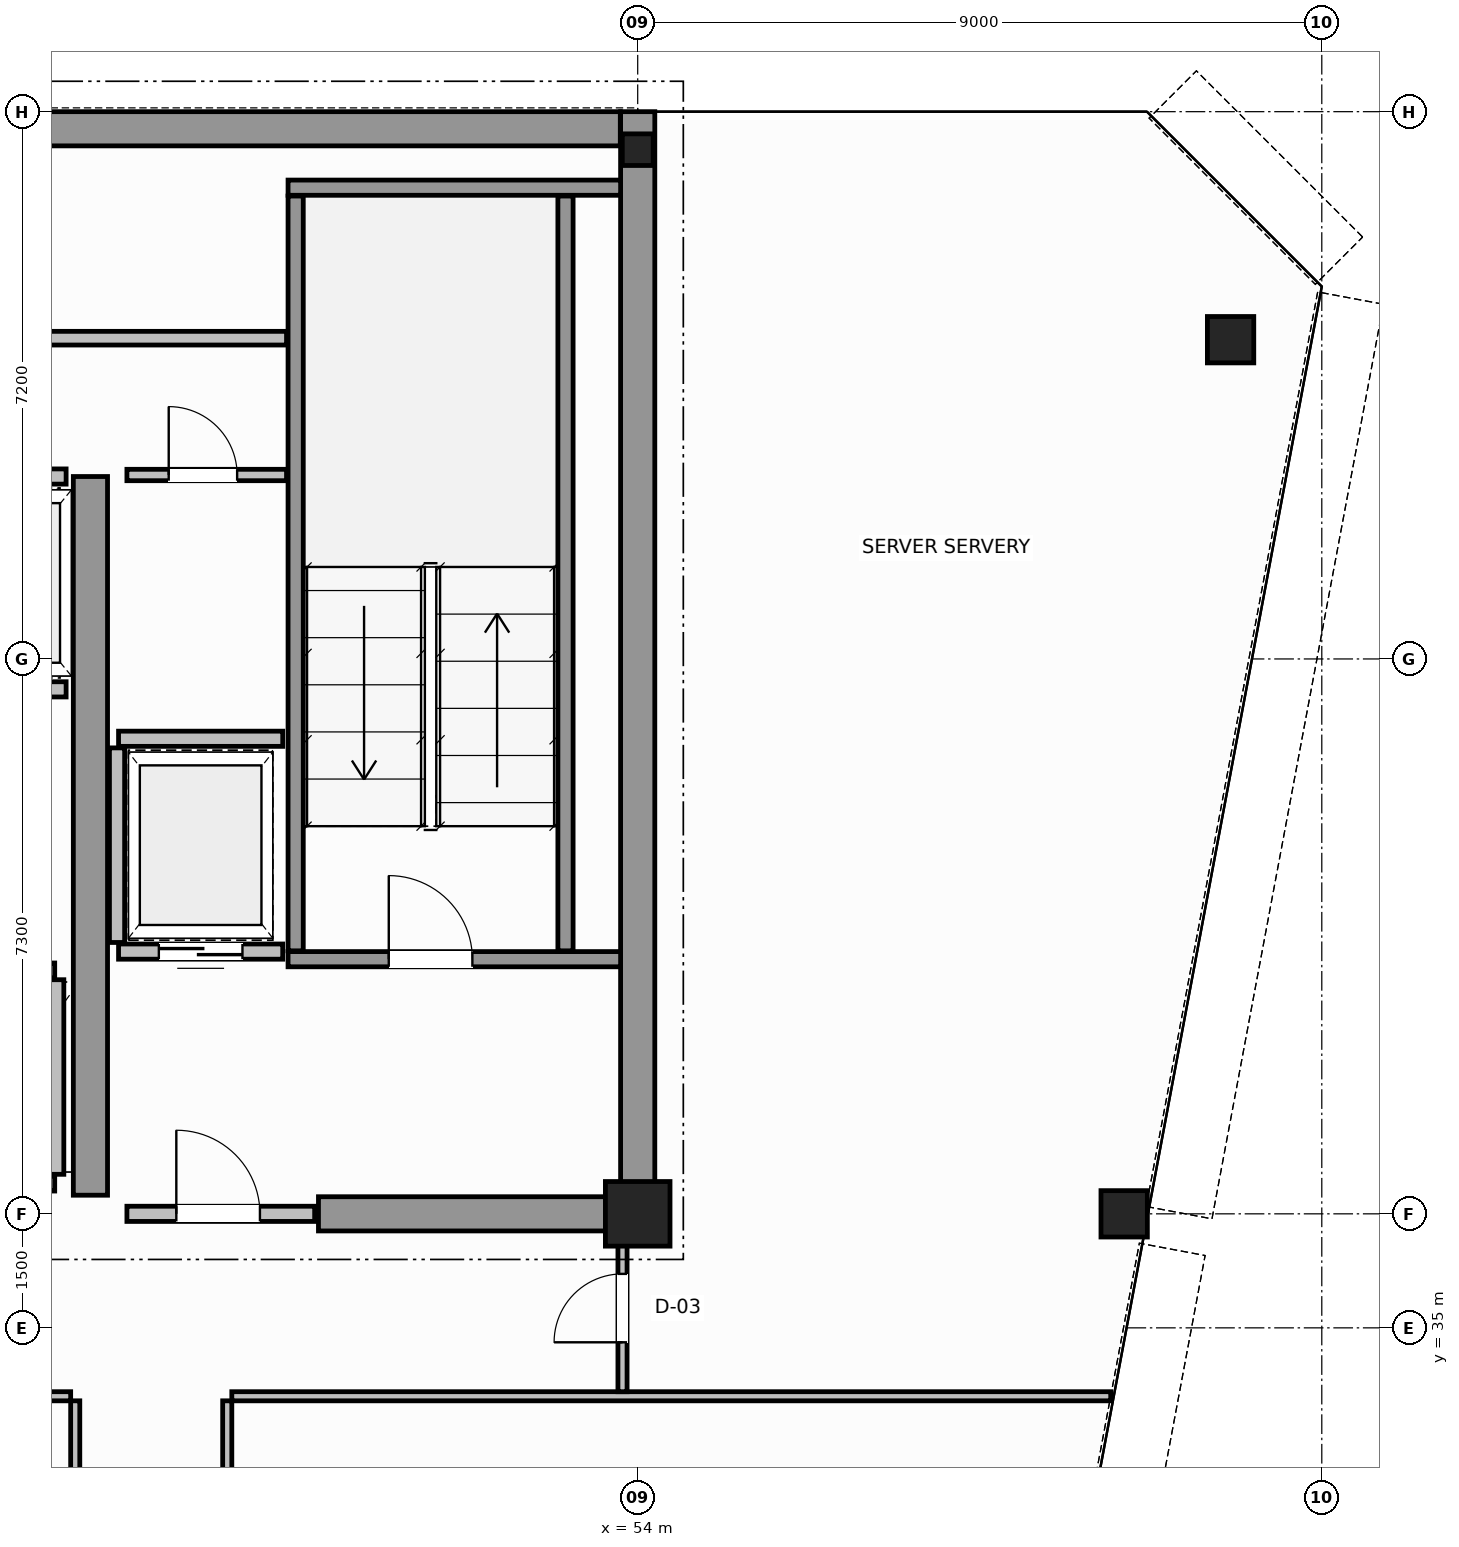
"""IFC4 building model, lengths in metres.
Left out: names, types, materials, properties, quantities, classifications, styles, units other than length and angle.
Written with IfcOpenShell. Run it as: python <this file> out.ifc"""

import sys

from ifc_helpers import new_model, si_unit, direction, frame, frame_2d, origin, origin_2d, place, context, subcontext, project, spatial, rectangle, hollow_circle, i_section, extrude, source, transform, mapped, element, fill, save


model = new_model("IFC4")
c1 = context("Model", 3, precision=1e-05, world=origin(), true_north=direction((0.0, 1.0)))
c2 = subcontext(c1, "Body", "Model", "MODEL_VIEW")
j1 = project(units=[si_unit("LENGTHUNIT", "METRE"), si_unit("PLANEANGLEUNIT", "RADIAN")], contexts=[c1])
p1 = place(None, origin())
s1 = spatial("IfcSite", under=j1, at=p1, CompositionType="ELEMENT")
p2 = place(p1, origin())
s2 = spatial("IfcBuilding", under=s1, at=p2, CompositionType="ELEMENT")
p3 = place(p2, frame((0.0, 0.0, 284.0)))
s3 = spatial("IfcBuildingStorey", under=s2, at=p3, CompositionType="ELEMENT", Elevation=284.0)
m1 = source(origin(), c2, "Body", "SweptSolid", [
    extrude(rectangle(XDim=0.85, YDim=0.85, at=origin_2d()), origin(), (0.0, 0.0, 1.0), 3.8),
])
p4 = place(p3, frame((54.0, 36.5, 0.0), z_axis=(0.0, 0.0, 1.0), x_axis=(1.0, 0.0, 0.0)))
e1 = element("IfcColumn", 1, at=p4, inside=s3, PredefinedType="COLUMN", context=c2, shape_type="MappedRepresentation", body=[
    mapped(m1, transform((0.0, 0.0, 0.0), scale=1.0)),
])
m2 = source(origin(), c2, "Body", "SweptSolid", [
    extrude(i_section(OverallWidth=0.406, OverallDepth=0.416, WebThickness=0.03, FlangeThickness=0.042, FilletRadius=0.015, at=origin_2d()), origin(), (0.0, 0.0, 1.0), 3.8),
])
p5 = place(p3, frame((54.0, 50.5, 0.0), z_axis=(0.0, 0.0, 1.0), x_axis=(1.0, 0.0, 0.0)))
e2 = element("IfcColumn", 2, at=p5, inside=s3, PredefinedType="COLUMN", context=c2, shape_type="MappedRepresentation", body=[
    mapped(m2, transform((0.0, 0.0, 0.0), scale=1.0)),
])
m3 = source(origin(), c2, "Body", "SweptSolid", [
    extrude(hollow_circle(Radius=0.305, WallThickness=0.03, at=origin_2d()), origin(), (0.0, 0.0, 1.0), 3.8),
])
for number, where, z_axis, x_axis in (
    (3, (61.8, 48.0, 0.0), (0.0, 0.0, 1.0), (1.0, 0.0, 0.0)),
    (4, (60.4, 36.5, 0.0), (0.0, 0.0, 1.0), (1.0, 0.0, 0.0)),
):
    element("IfcColumn", number, at=place(p3, frame(where, z_axis=z_axis, x_axis=x_axis)), inside=s3, PredefinedType="COLUMN", context=c2, shape_type="MappedRepresentation", body=[
        mapped(m3, transform((0.0, 0.0, 0.0), scale=1.0)),
    ])
p6 = place(p3, frame((34.002, 50.775, 0.0), z_axis=(0.0, 0.0, 1.0), x_axis=(1.0, 0.0, 0.0)))
e5 = element("IfcWall", 5, at=p6, inside=s3, PredefinedType="SHEAR", context=c2, shape_type="SweptSolid", body=[
    extrude(rectangle(XDim=19.769, YDim=0.45, at=frame_2d((9.885, 0.0))), origin(), (0.0, 0.0, 1.0), 3.8),
])
p7 = place(p3, frame((54.0, 36.5, 0.0), z_axis=(0.0, 0.0, 1.0), x_axis=(0.0, 1.0, 0.0)))
e6 = element("IfcWall", 6, at=p7, inside=s3, PredefinedType="SHEAR", context=c2, shape_type="SweptSolid", body=[
    extrude(rectangle(XDim=14.5, YDim=0.45, at=frame_2d((7.25, 0.0))), origin(), (0.0, 0.0, 1.0), 3.8),
])
p8 = place(p3, frame((49.8, 36.5, 0.0), z_axis=(0.0, 0.0, 1.0), x_axis=(1.0, 0.0, 0.0)))
e7 = element("IfcWall", 7, at=p8, inside=s3, PredefinedType="SHEAR", context=c2, shape_type="SweptSolid", body=[
    extrude(rectangle(XDim=3.955, YDim=0.45, at=frame_2d((1.978, 0.0))), origin(), (0.0, 0.0, 1.0), 2.58),
])
p9 = place(p3, frame((46.8, 36.745, 0.0), z_axis=(0.0, 0.0, 1.0), x_axis=(0.0, 1.0, 0.0)))
e8 = element("IfcWall", 8, at=p9, inside=s3, PredefinedType="SHEAR", context=c2, shape_type="SweptSolid", body=[
    extrude(rectangle(XDim=9.455, YDim=0.45, at=frame_2d((4.728, 0.0))), origin(), (0.0, 0.0, 1.0), 3.8),
])
p10 = place(p3, frame((49.4, 39.85, 0.0), z_axis=(0.0, 0.0, 1.0), x_axis=(1.0, 0.0, 0.0)))
e9 = element("IfcWall", 9, at=p10, inside=s3, PredefinedType="SOLIDWALL", context=c2, shape_type="SweptSolid", body=[
    extrude(rectangle(XDim=4.375, YDim=0.2, at=frame_2d((2.188, 0.0))), origin(), (0.0, 0.0, 1.0), 3.8),
])
p11 = place(p10, frame((1.325, 0.0, 0.0)))
e10 = element("IfcOpeningElement", 10, at=p11, cuts=e9, PredefinedType="OPENING", context=c2, shape_type="SweptSolid", body=[
    extrude(rectangle(XDim=1.1, YDim=2.15, at=frame_2d((0.55, 1.075))), frame((0.0, 0.11, 0.0), z_axis=(0.0, -1.0, 0.0), x_axis=(1.0, 0.0, 0.0)), (0.0, 0.0, 1.0), 0.22),
])
p12 = place(p3, frame((49.4, 50.0, 0.0), z_axis=(0.0, 0.0, 1.0), x_axis=(1.0, 0.0, 0.0)))
e11 = element("IfcWall", 11, at=p12, inside=s3, PredefinedType="SOLIDWALL", context=c2, shape_type="SweptSolid", body=[
    extrude(rectangle(XDim=4.375, YDim=0.2, at=frame_2d((2.188, 0.0))), origin(), (0.0, 0.0, 1.0), 3.8),
])
for number, where, z_axis, x_axis in (
    (12, (49.5, 39.96, 0.0), (0.0, 0.0, 1.0), (0.0, 1.0, 0.0)),
    (13, (53.05, 39.96, 0.0), (0.0, 0.0, 1.0), (0.0, 1.0, 0.0)),
):
    element("IfcWall", number, at=place(p3, frame(where, z_axis=z_axis, x_axis=x_axis)), inside=s3, PredefinedType="SOLIDWALL", context=c2, shape_type="SweptSolid", body=[
        extrude(rectangle(XDim=9.93, YDim=0.2, at=frame_2d((4.965, 0.0))), origin(), (0.0, 0.0, 1.0), 3.8),
    ])
p13 = place(p3, frame((47.28, 36.5, 0.0), z_axis=(0.0, 0.0, 1.0), x_axis=(1.0, 0.0, 0.0)))
e14 = element("IfcWall", 14, at=p13, inside=s3, PredefinedType="SOLIDWALL", context=c2, shape_type="SweptSolid", body=[
    extrude(rectangle(XDim=2.47, YDim=0.2, at=frame_2d((1.235, 0.0))), origin(), (0.0, 0.0, 1.0), 2.57),
])
p14 = place(p13, frame((0.65, 0.0, 0.0)))
e15 = element("IfcOpeningElement", 15, at=p14, cuts=e14, PredefinedType="OPENING", context=c2, shape_type="SweptSolid", body=[
    extrude(rectangle(XDim=1.1, YDim=2.15, at=frame_2d((0.55, 1.075))), frame((0.0, 0.11, 0.0), z_axis=(0.0, -1.0, 0.0), x_axis=(1.0, 0.0, 0.0)), (0.0, 0.0, 1.0), 0.22),
])
p15 = place(p3, frame((44.37, 39.7, 0.0), z_axis=(0.0, 0.0, 1.0), x_axis=(1.0, 0.0, 0.0)))
e16 = element("IfcWall", 16, at=p15, inside=s3, PredefinedType="SOLIDWALL", context=c2, shape_type="SweptSolid", body=[
    extrude(rectangle(XDim=1.96, YDim=0.2, at=frame_2d((0.98, 0.0))), origin(), (0.0, 0.0, 1.0), 3.58),
])
p16 = place(p15, frame((0.43, 0.0, 0.0)))
e17 = element("IfcOpeningElement", 17, at=p16, cuts=e16, PredefinedType="OPENING", context=c2, shape_type="SweptSolid", body=[
    extrude(rectangle(XDim=1.1, YDim=2.15, at=frame_2d((0.55, 1.075))), frame((0.0, 0.11, 0.0), z_axis=(0.0, -1.0, 0.0), x_axis=(1.0, 0.0, 0.0)), (0.0, 0.0, 1.0), 0.22),
])
p17 = place(p3, frame((44.37, 36.9, 0.0), z_axis=(0.0, 0.0, 1.0), x_axis=(1.0, 0.0, 0.0)))
e18 = element("IfcWall", 18, at=p17, inside=s3, PredefinedType="SOLIDWALL", context=c2, shape_type="SweptSolid", body=[
    extrude(rectangle(XDim=1.96, YDim=0.2, at=frame_2d((0.98, 0.0))), origin(), (0.0, 0.0, 1.0), 2.57),
])
p18 = place(p3, frame((46.35, 37.02, 0.0), z_axis=(0.0, 0.0, 1.0), x_axis=(0.0, 1.0, 0.0)))
e19 = element("IfcWall", 19, at=p18, inside=s3, PredefinedType="SOLIDWALL", context=c2, shape_type="SweptSolid", body=[
    extrude(rectangle(XDim=2.56, YDim=0.2, at=frame_2d((1.28, 0.0))), origin(), (0.0, 0.0, 1.0), 3.58),
])
p19 = place(p3, frame((44.62, 43.4, 0.0), z_axis=(0.0, 0.0, 1.0), x_axis=(1.0, 0.0, 0.0)))
e20 = element("IfcWall", 20, at=p19, inside=s3, PredefinedType="SOLIDWALL", context=c2, shape_type="SweptSolid", body=[
    extrude(rectangle(XDim=1.86, YDim=0.2, at=frame_2d((0.93, 0.0))), origin(), (0.0, 0.0, 1.0), 3.58),
])
p20 = place(p19, frame((0.38, 0.0, 0.0)))
e21 = element("IfcOpeningElement", 21, at=p20, cuts=e20, PredefinedType="OPENING", context=c2, shape_type="SweptSolid", body=[
    extrude(rectangle(XDim=1.1, YDim=2.15, at=frame_2d((0.55, 1.075))), frame((0.0, 0.11, 0.0), z_axis=(0.0, -1.0, 0.0), x_axis=(1.0, 0.0, 0.0)), (0.0, 0.0, 1.0), 0.22),
])
p21 = place(p3, frame((44.62, 46.2, 0.0), z_axis=(0.0, 0.0, 1.0), x_axis=(1.0, 0.0, 0.0)))
e22 = element("IfcWall", 22, at=p21, inside=s3, PredefinedType="SOLIDWALL", context=c2, shape_type="SweptSolid", body=[
    extrude(rectangle(XDim=1.86, YDim=0.2, at=frame_2d((0.93, 0.0))), origin(), (0.0, 0.0, 1.0), 3.58),
])
p22 = place(p3, frame((47.17, 39.95, 0.0), z_axis=(0.0, 0.0, 1.0), x_axis=(1.0, 0.0, 0.0)))
e23 = element("IfcWall", 23, at=p22, inside=s3, PredefinedType="SOLIDWALL", context=c2, shape_type="SweptSolid", body=[
    extrude(rectangle(XDim=2.16, YDim=0.2, at=frame_2d((1.08, 0.0))), origin(), (0.0, 0.0, 1.0), 3.58),
])
p23 = place(p22, frame((0.53, 0.0, 0.0)))
e24 = element("IfcOpeningElement", 24, at=p23, cuts=e23, PredefinedType="OPENING", context=c2, shape_type="SweptSolid", body=[
    extrude(rectangle(XDim=1.1, YDim=2.15, at=frame_2d((0.55, 1.075))), frame((0.0, 0.11, 0.0), z_axis=(0.0, -1.0, 0.0), x_axis=(1.0, 0.0, 0.0)), (0.0, 0.0, 1.0), 0.22),
])
p24 = place(p3, frame((47.17, 42.75, 0.0), z_axis=(0.0, 0.0, 1.0), x_axis=(1.0, 0.0, 0.0)))
e25 = element("IfcWall", 25, at=p24, inside=s3, PredefinedType="SOLIDWALL", context=c2, shape_type="SweptSolid", body=[
    extrude(rectangle(XDim=2.16, YDim=0.2, at=frame_2d((1.08, 0.0))), origin(), (0.0, 0.0, 1.0), 3.58),
])
p25 = place(p3, frame((47.15, 40.07, 0.0), z_axis=(0.0, 0.0, 1.0), x_axis=(0.0, 1.0, 0.0)))
e26 = element("IfcWall", 26, at=p25, inside=s3, PredefinedType="SOLIDWALL", context=c2, shape_type="SweptSolid", body=[
    extrude(rectangle(XDim=2.56, YDim=0.2, at=frame_2d((1.28, 0.0))), origin(), (0.0, 0.0, 1.0), 3.58),
])
p26 = place(p3, frame((47.28, 46.22, 0.0), z_axis=(0.0, 0.0, 1.0), x_axis=(1.0, 0.0, 0.0)))
e27 = element("IfcWall", 27, at=p26, inside=s3, PredefinedType="PARTITIONING", context=c2, shape_type="SweptSolid", body=[
    extrude(rectangle(XDim=2.1, YDim=0.15, at=frame_2d((1.05, 0.0))), origin(), (0.0, 0.0, 1.0), 3.58),
])
p27 = place(p26, frame((0.55, 0.0, 0.0)))
e28 = element("IfcOpeningElement", 28, at=p27, cuts=e27, PredefinedType="OPENING", context=c2, shape_type="SweptSolid", body=[
    extrude(rectangle(XDim=0.9, YDim=2.1, at=frame_2d((0.45, 1.05))), frame((0.0, 0.085, 0.0), z_axis=(0.0, -1.0, 0.0), x_axis=(1.0, 0.0, 0.0)), (0.0, 0.0, 1.0), 0.17),
])
p28 = place(p3, frame((18.62, 48.02, 0.0), z_axis=(0.0, 0.0, 1.0), x_axis=(1.0, 0.0, 0.0)))
e29 = element("IfcWall", 29, at=p28, inside=s3, PredefinedType="PLUMBINGWALL", context=c2, shape_type="SweptSolid", body=[
    extrude(rectangle(XDim=30.76, YDim=0.18, at=frame_2d((15.38, 0.0))), origin(), (0.0, 0.0, 1.0), 3.58),
])
p29 = place(p28, frame((1.955, 0.0, 0.0)))
e30 = element("IfcOpeningElement", 30, at=p29, cuts=e29, PredefinedType="OPENING", context=c2, shape_type="SweptSolid", body=[
    extrude(rectangle(XDim=0.9, YDim=2.15, at=frame_2d((0.45, 1.075))), frame((0.0, 0.1, 0.0), z_axis=(0.0, -1.0, 0.0), x_axis=(1.0, 0.0, 0.0)), (0.0, 0.0, 1.0), 0.2),
])
p30 = place(p28, frame((8.03, 0.0, 0.0)))
e31 = element("IfcOpeningElement", 31, at=p30, cuts=e29, PredefinedType="OPENING", context=c2, shape_type="SweptSolid", body=[
    extrude(rectangle(XDim=0.9, YDim=2.15, at=frame_2d((0.45, 1.075))), frame((0.0, 0.1, 0.0), z_axis=(0.0, -1.0, 0.0), x_axis=(1.0, 0.0, 0.0)), (0.0, 0.0, 1.0), 0.2),
])
p31 = place(p28, frame((16.93, 0.0, 0.0)))
e32 = element("IfcOpeningElement", 32, at=p31, cuts=e29, PredefinedType="OPENING", context=c2, shape_type="SweptSolid", body=[
    extrude(rectangle(XDim=0.9, YDim=2.15, at=frame_2d((0.45, 1.075))), frame((0.0, 0.1, 0.0), z_axis=(0.0, -1.0, 0.0), x_axis=(1.0, 0.0, 0.0)), (0.0, 0.0, 1.0), 0.2),
])
p32 = place(p28, frame((26.205, 0.0, 0.0)))
e33 = element("IfcOpeningElement", 33, at=p32, cuts=e29, PredefinedType="OPENING", context=c2, shape_type="SweptSolid", body=[
    extrude(rectangle(XDim=0.9, YDim=2.15, at=frame_2d((0.45, 1.075))), frame((0.0, 0.1, 0.0), z_axis=(0.0, -1.0, 0.0), x_axis=(1.0, 0.0, 0.0)), (0.0, 0.0, 1.0), 0.2),
])
p33 = place(p3, frame((21.46, 34.1, 0.0), z_axis=(0.0, 0.0, 1.0), x_axis=(1.0, 0.0, 0.0)))
e34 = element("IfcWall", 34, at=p33, inside=s3, PredefinedType="PARTITIONING", context=c2, shape_type="SweptSolid", body=[
    extrude(rectangle(XDim=25.08, YDim=0.12, at=frame_2d((12.54, 0.0))), origin(), (0.0, 0.0, 1.0), 3.58),
])
p34 = place(p33, frame((5.59, 0.0, 0.0)))
e35 = element("IfcOpeningElement", 35, at=p34, cuts=e34, PredefinedType="OPENING", context=c2, shape_type="SweptSolid", body=[
    extrude(rectangle(XDim=0.9, YDim=2.15, at=frame_2d((0.45, 1.075))), frame((0.0, 0.07, 0.0), z_axis=(0.0, -1.0, 0.0), x_axis=(1.0, 0.0, 0.0)), (0.0, 0.0, 1.0), 0.14),
])
p35 = place(p33, frame((18.19, 0.0, 0.0)))
e36 = element("IfcOpeningElement", 36, at=p35, cuts=e34, PredefinedType="OPENING", context=c2, shape_type="SweptSolid", body=[
    extrude(rectangle(XDim=0.9, YDim=2.15, at=frame_2d((0.45, 1.075))), frame((0.0, 0.07, 0.0), z_axis=(0.0, -1.0, 0.0), x_axis=(1.0, 0.0, 0.0)), (0.0, 0.0, 1.0), 0.14),
])
p36 = place(p3, frame((48.66, 34.1, 0.0), z_axis=(0.0, 0.0, 1.0), x_axis=(1.0, 0.0, 0.0)))
e37 = element("IfcWall", 37, at=p36, inside=s3, PredefinedType="PARTITIONING", context=c2, shape_type="SweptSolid", body=[
    extrude(rectangle(XDim=11.563, YDim=0.12, at=frame_2d((5.782, 0.0))), origin(), (0.0, 0.0, 1.0), 3.58),
])
p37 = place(p3, frame((53.8, 34.16, 0.0), z_axis=(0.0, 0.0, 1.0), x_axis=(0.0, 1.0, 0.0)))
e38 = element("IfcWall", 38, at=p37, inside=s3, PredefinedType="PARTITIONING", context=c2, shape_type="SweptSolid", body=[
    extrude(rectangle(XDim=2.28, YDim=0.12, at=frame_2d((1.14, 0.0))), origin(), (0.0, 0.0, 1.0), 3.58),
])
p38 = place(p37, frame((0.65, 0.0, 0.0)))
e39 = element("IfcOpeningElement", 39, at=p38, cuts=e38, PredefinedType="OPENING", context=c2, shape_type="SweptSolid", body=[
    extrude(rectangle(XDim=0.9, YDim=2.15, at=frame_2d((0.45, 1.075))), frame((0.0, 0.07, 0.0), z_axis=(0.0, -1.0, 0.0), x_axis=(1.0, 0.0, 0.0)), (0.0, 0.0, 1.0), 0.14),
])
p39 = place(p3, frame((46.6, 20.4, 0.0), z_axis=(0.0, 0.0, 1.0), x_axis=(0.0, 1.0, 0.0)))
e40 = element("IfcWall", 40, at=p39, inside=s3, PredefinedType="PARTITIONING", context=c2, shape_type="SweptSolid", body=[
    extrude(rectangle(XDim=13.64, YDim=0.12, at=frame_2d((6.82, 0.0))), origin(), (0.0, 0.0, 1.0), 3.58),
])
p40 = place(p3, frame((48.6, 20.4, 0.0), z_axis=(0.0, 0.0, 1.0), x_axis=(0.0, 1.0, 0.0)))
e41 = element("IfcWall", 41, at=p40, inside=s3, PredefinedType="PARTITIONING", context=c2, shape_type="SweptSolid", body=[
    extrude(rectangle(XDim=13.64, YDim=0.12, at=frame_2d((6.82, 0.0))), origin(), (0.0, 0.0, 1.0), 3.58),
])
p41 = place(p40, frame((2.55, 0.0, 0.0)))
e42 = element("IfcOpeningElement", 42, at=p41, cuts=e41, PredefinedType="OPENING", context=c2, shape_type="SweptSolid", body=[
    extrude(rectangle(XDim=0.9, YDim=2.15, at=frame_2d((0.45, 1.075))), frame((0.0, 0.07, 0.0), z_axis=(0.0, -1.0, 0.0), x_axis=(1.0, 0.0, 0.0)), (0.0, 0.0, 1.0), 0.14),
])
p42 = place(p40, frame((9.37, 0.0, 0.0)))
e43 = element("IfcOpeningElement", 43, at=p42, cuts=e41, PredefinedType="OPENING", context=c2, shape_type="SweptSolid", body=[
    extrude(rectangle(XDim=0.9, YDim=2.15, at=frame_2d((0.45, 1.075))), frame((0.0, 0.07, 0.0), z_axis=(0.0, -1.0, 0.0), x_axis=(1.0, 0.0, 0.0)), (0.0, 0.0, 1.0), 0.14),
])
m4 = source(origin(), c2, "Body", "SweptSolid", [
    extrude(rectangle(XDim=1.1, YDim=2.15, at=frame_2d((0.55, 1.075))), frame((0.0, 0.025, 0.0), z_axis=(0.0, -1.0, 0.0), x_axis=(1.0, 0.0, 0.0)), (0.0, 0.0, 1.0), 0.05),
])
p43 = place(p11, origin())
e44 = element("IfcDoor", 44, at=p43, inside=s3, OperationType="SINGLE_SWING_RIGHT", PredefinedType="DOOR", context=c2, shape_type="MappedRepresentation", body=[
    mapped(m4, transform((0.0, 0.0, 0.0), scale=1.0)),
])
fill(e10, e44)
p44 = place(p14, origin())
e45 = element("IfcDoor", 45, at=p44, inside=s3, OperationType="SINGLE_SWING_LEFT", PredefinedType="DOOR", context=c2, shape_type="MappedRepresentation", body=[
    mapped(m4, transform((0.0, 0.0, 0.0), scale=1.0)),
])
fill(e15, e45)
p45 = place(p23, origin())
e46 = element("IfcDoor", 46, at=p45, inside=s3, OperationType="DOUBLE_DOOR_SLIDING", PredefinedType="DOOR", context=c2, shape_type="MappedRepresentation", body=[
    mapped(m4, transform((0.0, 0.0, 0.0), scale=1.0)),
])
fill(e24, e46)
m5 = source(origin(), c2, "Body", "SweptSolid", [
    extrude(rectangle(XDim=0.9, YDim=2.1, at=frame_2d((0.45, 1.05))), frame((0.0, 0.025, 0.0), z_axis=(0.0, -1.0, 0.0), x_axis=(1.0, 0.0, 0.0)), (0.0, 0.0, 1.0), 0.05),
])
p46 = place(p27, origin())
e47 = element("IfcDoor", 47, at=p46, inside=s3, OperationType="SINGLE_SWING_RIGHT", PredefinedType="DOOR", context=c2, shape_type="MappedRepresentation", body=[
    mapped(m5, transform((0.0, 0.0, 0.0), scale=1.0)),
])
fill(e28, e47)
m6 = source(origin(), c2, "Body", "SweptSolid", [
    extrude(rectangle(XDim=0.9, YDim=2.15, at=frame_2d((0.45, 1.075))), frame((0.0, 0.025, 0.0), z_axis=(0.0, -1.0, 0.0), x_axis=(1.0, 0.0, 0.0)), (0.0, 0.0, 1.0), 0.05),
])
p47 = place(p38, origin())
e48 = element("IfcDoor", 48, at=p47, inside=s3, OperationType="SINGLE_SWING_RIGHT", PredefinedType="DOOR", context=c2, shape_type="MappedRepresentation", body=[
    mapped(m6, transform((0.0, 0.0, 0.0), scale=1.0)),
])
fill(e39, e48)
save(model, sys.argv[1])
